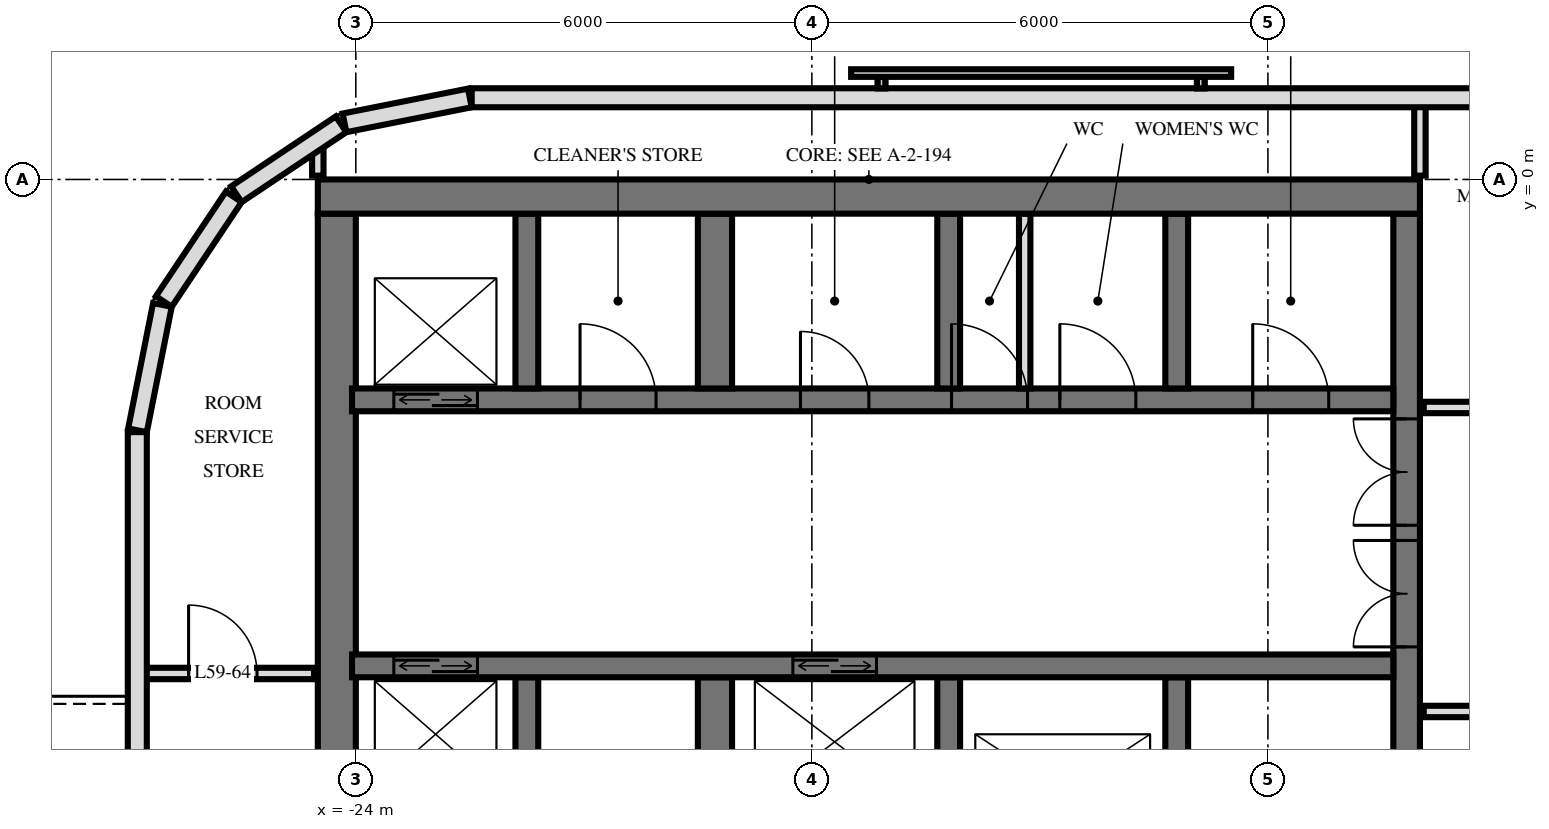
"""IFC4 building model, lengths in metres.
Left out: names, types, materials, properties, quantities, classifications, styles, units other than length and angle.
Written with IfcOpenShell. Run it as: python <this file> out.ifc"""

import sys

from ifc_helpers import new_model, si_unit, direction, frame, frame_2d, origin, place, context, subcontext, project, spatial, rectangle, extrude, element, fill, save


model = new_model("IFC4")
c1 = context("Model", 3, precision=1e-05, world=origin(), true_north=direction((0.0, 1.0)))
c2 = subcontext(c1, "Body", "Model", "MODEL_VIEW")
j1 = project(units=[si_unit("LENGTHUNIT", "METRE"), si_unit("PLANEANGLEUNIT", "RADIAN")], contexts=[c1])
p1 = place(None, origin())
s1 = spatial("IfcSite", under=j1, at=p1, CompositionType="ELEMENT")
p2 = place(p1, origin())
s2 = spatial("IfcBuilding", under=s1, at=p2, CompositionType="ELEMENT")
p3 = place(p2, frame((0.0, 0.0, 225.6)))
s3 = spatial("IfcBuildingStorey", under=s2, at=p3, CompositionType="ELEMENT", Elevation=225.6)
p4 = place(p3, frame((-24.5, -0.225, 0.0), z_axis=(0.0, 0.0, 1.0), x_axis=(1.0, 0.0, 0.0)))
e1 = element("IfcWall", 1, at=p4, inside=s3, PredefinedType="SHEAR", context=c2, shape_type="SweptSolid", body=[
    extrude(rectangle(XDim=14.5, YDim=0.45, at=frame_2d((7.25, 0.0))), origin(), (0.0, 0.0, 1.0), 3.5),
])
p5 = place(p3, frame((-10.175, -14.55, 0.0), z_axis=(0.0, 0.0, 1.0), x_axis=(0.0, 1.0, 0.0)))
e2 = element("IfcWall", 2, at=p5, inside=s3, PredefinedType="SHEAR", context=c2, shape_type="SweptSolid", body=[
    extrude(rectangle(XDim=14.1, YDim=0.35, at=frame_2d((7.05, 0.0))), origin(), (0.0, 0.0, 1.0), 3.5),
])
p6 = place(p5, frame((8.4, 0.0, 0.0)))
e3 = element("IfcOpeningElement", 3, at=p6, cuts=e2, PredefinedType="OPENING", context=c2, shape_type="SweptSolid", body=[
    extrude(rectangle(XDim=1.4, YDim=2.4, at=frame_2d((0.7, 1.2))), frame((0.0, 0.185, 0.0), z_axis=(0.0, -1.0, 0.0), x_axis=(1.0, 0.0, 0.0)), (0.0, 0.0, 1.0), 0.37),
])
p7 = place(p5, frame((10.0, 0.0, 0.0)))
e4 = element("IfcOpeningElement", 4, at=p7, cuts=e2, PredefinedType="OPENING", context=c2, shape_type="SweptSolid", body=[
    extrude(rectangle(XDim=1.4, YDim=2.4, at=frame_2d((0.7, 1.2))), frame((0.0, 0.185, 0.0), z_axis=(0.0, -1.0, 0.0), x_axis=(1.0, 0.0, 0.0)), (0.0, 0.0, 1.0), 0.37),
])
p8 = place(p5, frame((4.0, 0.0, 0.0)))
e5 = element("IfcOpeningElement", 5, at=p8, cuts=e2, PredefinedType="OPENING", context=c2, shape_type="SweptSolid", body=[
    extrude(rectangle(XDim=1.2, YDim=2.1, at=frame_2d((0.6, 1.05))), frame((0.0, 0.185, 0.0), z_axis=(0.0, -1.0, 0.0), x_axis=(1.0, 0.0, 0.0)), (0.0, 0.0, 1.0), 0.37),
])
p9 = place(p3, frame((-24.25, -14.55, 0.0), z_axis=(0.0, 0.0, 1.0), x_axis=(0.0, 1.0, 0.0)))
e6 = element("IfcWall", 6, at=p9, inside=s3, PredefinedType="SHEAR", context=c2, shape_type="SweptSolid", body=[
    extrude(rectangle(XDim=14.1, YDim=0.5, at=frame_2d((7.05, 0.0))), origin(), (0.0, 0.0, 1.0), 3.5),
])
p10 = place(p3, frame((-24.05, -2.9, 0.0), z_axis=(0.0, 0.0, 1.0), x_axis=(1.0, 0.0, 0.0)))
e7 = element("IfcWall", 7, at=p10, inside=s3, PredefinedType="SHEAR", context=c2, shape_type="SweptSolid", body=[
    extrude(rectangle(XDim=13.7, YDim=0.3, at=frame_2d((6.85, 0.0))), origin(), (0.0, 0.0, 1.0), 3.5),
])
p11 = place(p10, frame((0.55, 0.0, 0.0)))
e8 = element("IfcOpeningElement", 8, at=p11, cuts=e7, PredefinedType="OPENING", context=c2, shape_type="SweptSolid", body=[
    extrude(rectangle(XDim=1.1, YDim=2.1, at=frame_2d((0.55, 1.05))), frame((0.0, 0.16, 0.0), z_axis=(0.0, -1.0, 0.0), x_axis=(1.0, 0.0, 0.0)), (0.0, 0.0, 1.0), 0.32),
])
p12 = place(p10, frame((5.9, 0.0, 0.0)))
e9 = element("IfcOpeningElement", 9, at=p12, cuts=e7, PredefinedType="OPENING", context=c2, shape_type="SweptSolid", body=[
    extrude(rectangle(XDim=0.9, YDim=2.1, at=frame_2d((0.45, 1.05))), frame((0.0, 0.16, 0.0), z_axis=(0.0, -1.0, 0.0), x_axis=(1.0, 0.0, 0.0)), (0.0, 0.0, 1.0), 0.32),
])
p13 = place(p10, frame((11.85, 0.0, 0.0)))
e10 = element("IfcOpeningElement", 10, at=p13, cuts=e7, PredefinedType="OPENING", context=c2, shape_type="SweptSolid", body=[
    extrude(rectangle(XDim=1.0, YDim=2.1, at=frame_2d((0.5, 1.05))), frame((0.0, 0.16, 0.0), z_axis=(0.0, -1.0, 0.0), x_axis=(1.0, 0.0, 0.0)), (0.0, 0.0, 1.0), 0.32),
])
p14 = place(p10, frame((9.312, 0.0, 0.0)))
e11 = element("IfcOpeningElement", 11, at=p14, cuts=e7, PredefinedType="OPENING", context=c2, shape_type="SweptSolid", body=[
    extrude(rectangle(XDim=1.0, YDim=2.1, at=frame_2d((0.5, 1.05))), frame((0.0, 0.16, 0.0), z_axis=(0.0, -1.0, 0.0), x_axis=(1.0, 0.0, 0.0)), (0.0, 0.0, 1.0), 0.32),
])
p15 = place(p10, frame((7.887, 0.0, 0.0)))
e12 = element("IfcOpeningElement", 12, at=p15, cuts=e7, PredefinedType="OPENING", context=c2, shape_type="SweptSolid", body=[
    extrude(rectangle(XDim=1.0, YDim=2.1, at=frame_2d((0.5, 1.05))), frame((0.0, 0.16, 0.0), z_axis=(0.0, -1.0, 0.0), x_axis=(1.0, 0.0, 0.0)), (0.0, 0.0, 1.0), 0.32),
])
p16 = place(p10, frame((3.0, 0.0, 0.0)))
e13 = element("IfcOpeningElement", 13, at=p16, cuts=e7, PredefinedType="OPENING", context=c2, shape_type="SweptSolid", body=[
    extrude(rectangle(XDim=1.0, YDim=2.1, at=frame_2d((0.5, 1.05))), frame((0.0, 0.16, 0.0), z_axis=(0.0, -1.0, 0.0), x_axis=(1.0, 0.0, 0.0)), (0.0, 0.0, 1.0), 0.32),
])
p17 = place(p3, frame((-24.05, -6.4, 0.0), z_axis=(0.0, 0.0, 1.0), x_axis=(1.0, 0.0, 0.0)))
e14 = element("IfcWall", 14, at=p17, inside=s3, PredefinedType="SHEAR", context=c2, shape_type="SweptSolid", body=[
    extrude(rectangle(XDim=13.7, YDim=0.3, at=frame_2d((6.85, 0.0))), origin(), (0.0, 0.0, 1.0), 3.5),
])
p18 = place(p17, frame((0.55, 0.0, 0.0)))
e15 = element("IfcOpeningElement", 15, at=p18, cuts=e14, PredefinedType="OPENING", context=c2, shape_type="SweptSolid", body=[
    extrude(rectangle(XDim=1.1, YDim=2.1, at=frame_2d((0.55, 1.05))), frame((0.0, 0.16, 0.0), z_axis=(0.0, -1.0, 0.0), x_axis=(1.0, 0.0, 0.0)), (0.0, 0.0, 1.0), 0.32),
])
p19 = place(p17, frame((5.8, 0.0, 0.0)))
e16 = element("IfcOpeningElement", 16, at=p19, cuts=e14, PredefinedType="OPENING", context=c2, shape_type="SweptSolid", body=[
    extrude(rectangle(XDim=1.1, YDim=2.1, at=frame_2d((0.55, 1.05))), frame((0.0, 0.16, 0.0), z_axis=(0.0, -1.0, 0.0), x_axis=(1.0, 0.0, 0.0)), (0.0, 0.0, 1.0), 0.32),
])
for number, where, z_axis, x_axis in (
    (17, (-13.2, -2.75, 0.0), (0.0, 0.0, 1.0), (0.0, 1.0, 0.0)),
    (18, (-13.2, -8.85, 0.0), (0.0, 0.0, 1.0), (0.0, 1.0, 0.0)),
    (19, (-16.2, -2.75, 0.0), (0.0, 0.0, 1.0), (0.0, 1.0, 0.0)),
    (20, (-16.2, -8.85, 0.0), (0.0, 0.0, 1.0), (0.0, 1.0, 0.0)),
):
    element("IfcWall", number, at=place(p3, frame(where, z_axis=z_axis, x_axis=x_axis)), inside=s3, PredefinedType="SHEAR", context=c2, shape_type="SweptSolid", body=[
        extrude(rectangle(XDim=2.3, YDim=0.3, at=frame_2d((1.15, 0.0))), origin(), (0.0, 0.0, 1.0), 3.5),
    ])
for number, where, z_axis, x_axis in (
    (21, (-19.275, -2.75, 0.0), (0.0, 0.0, 1.0), (0.0, 1.0, 0.0)),
    (22, (-19.275, -8.85, 0.0), (0.0, 0.0, 1.0), (0.0, 1.0, 0.0)),
):
    element("IfcWall", number, at=place(p3, frame(where, z_axis=z_axis, x_axis=x_axis)), inside=s3, PredefinedType="SHEAR", context=c2, shape_type="SweptSolid", body=[
        extrude(rectangle(XDim=2.3, YDim=0.45, at=frame_2d((1.15, 0.0))), origin(), (0.0, 0.0, 1.0), 3.5),
    ])
for number, where, z_axis, x_axis in (
    (23, (-21.75, -2.75, 0.0), (0.0, 0.0, 1.0), (0.0, 1.0, 0.0)),
    (24, (-21.75, -8.85, 0.0), (0.0, 0.0, 1.0), (0.0, 1.0, 0.0)),
):
    element("IfcWall", number, at=place(p3, frame(where, z_axis=z_axis, x_axis=x_axis)), inside=s3, PredefinedType="SHEAR", context=c2, shape_type="SweptSolid", body=[
        extrude(rectangle(XDim=2.3, YDim=0.3, at=frame_2d((1.15, 0.0))), origin(), (0.0, 0.0, 1.0), 3.5),
    ])
p20 = place(p3, frame((22.475, 1.075, 0.0), z_axis=(0.0, 0.0, 1.0), x_axis=(-1.0, 0.0, 0.0)))
e25 = element("IfcWall", 25, at=p20, inside=s3, PredefinedType="SOLIDWALL", context=c2, shape_type="SweptSolid", body=[
    extrude(rectangle(XDim=44.951, YDim=0.25, at=frame_2d((22.475, 0.0))), origin(), (0.0, 0.0, 1.0), 3.22),
])
p21 = place(p20, frame((15.275, 0.0, 0.9)))
e26 = element("IfcOpeningElement", 26, at=p21, cuts=e25, PredefinedType="OPENING", context=c2, shape_type="SweptSolid", body=[
    extrude(rectangle(XDim=2.4, YDim=1.5, at=frame_2d((1.2, 0.75))), frame((0.0, 0.135, 0.0), z_axis=(0.0, -1.0, 0.0), x_axis=(1.0, 0.0, 0.0)), (0.0, 0.0, 1.0), 0.27),
])
p22 = place(p20, frame((18.275, 0.0, 0.9)))
e27 = element("IfcOpeningElement", 27, at=p22, cuts=e25, PredefinedType="OPENING", context=c2, shape_type="SweptSolid", body=[
    extrude(rectangle(XDim=2.4, YDim=1.5, at=frame_2d((1.2, 0.75))), frame((0.0, 0.135, 0.0), z_axis=(0.0, -1.0, 0.0), x_axis=(1.0, 0.0, 0.0)), (0.0, 0.0, 1.0), 0.27),
])
p23 = place(p20, frame((29.275, 0.0, 0.9)))
e28 = element("IfcOpeningElement", 28, at=p23, cuts=e25, PredefinedType="OPENING", context=c2, shape_type="SweptSolid", body=[
    extrude(rectangle(XDim=2.4, YDim=1.5, at=frame_2d((1.2, 0.75))), frame((0.0, 0.135, 0.0), z_axis=(0.0, -1.0, 0.0), x_axis=(1.0, 0.0, 0.0)), (0.0, 0.0, 1.0), 0.27),
])
p24 = place(p3, frame((-22.5, 1.073, 0.0), z_axis=(0.0, 0.0, 1.0), x_axis=(-0.980803419081, -0.194999110559, 0.0)))
e29 = element("IfcWall", 29, at=p24, inside=s3, PredefinedType="SOLIDWALL", context=c2, shape_type="SweptSolid", body=[
    extrude(rectangle(XDim=1.681, YDim=0.25, at=frame_2d((0.841, 0.0))), origin(), (0.0, 0.0, 1.0), 3.22),
])
for number, where, z_axis, x_axis in (
    (30, (-24.194, 0.726, 0.0), (0.0, 0.0, 1.0), (-0.831, -0.556, 0.0)),
    (31, (-25.606, -0.229, 0.0), (0.0, 0.0, 1.0), (-0.556, -0.831, 0.0)),
):
    element("IfcWall", number, at=place(p3, frame(where, z_axis=z_axis, x_axis=x_axis)), inside=s3, PredefinedType="SOLIDWALL", context=c2, shape_type="SweptSolid", body=[
        extrude(rectangle(XDim=1.656, YDim=0.25, at=frame_2d((0.828, 0.0))), origin(), (0.0, 0.0, 1.0), 3.22),
    ])
p25 = place(p3, frame((-26.545, -1.651, 0.0), z_axis=(0.0, 0.0, 1.0), x_axis=(-0.194999110559, -0.980803419081, 0.0)))
e32 = element("IfcWall", 32, at=p25, inside=s3, PredefinedType="SOLIDWALL", context=c2, shape_type="SweptSolid", body=[
    extrude(rectangle(XDim=1.681, YDim=0.25, at=frame_2d((0.841, 0.0))), origin(), (0.0, 0.0, 1.0), 3.22),
])
p26 = place(p3, frame((-26.875, -3.325, 0.0), z_axis=(0.0, 0.0, 1.0), x_axis=(0.0, -1.0, 0.0)))
e33 = element("IfcWall", 33, at=p26, inside=s3, PredefinedType="SOLIDWALL", context=c2, shape_type="SweptSolid", body=[
    extrude(rectangle(XDim=21.551, YDim=0.25, at=frame_2d((10.775, 0.0))), origin(), (0.0, 0.0, 1.0), 3.22),
])
p27 = place(p26, frame((6.575, 0.0, 0.0)))
e34 = element("IfcOpeningElement", 34, at=p27, cuts=e33, PredefinedType="OPENING", context=c2, shape_type="SweptSolid", body=[
    extrude(rectangle(XDim=1.8, YDim=2.4, at=frame_2d((0.9, 1.2))), frame((0.0, 0.135, 0.0), z_axis=(0.0, -1.0, 0.0), x_axis=(1.0, 0.0, 0.0)), (0.0, 0.0, 1.0), 0.27),
])
p28 = place(p26, frame((9.425, 0.0, 0.9)))
e35 = element("IfcOpeningElement", 35, at=p28, cuts=e33, PredefinedType="OPENING", context=c2, shape_type="SweptSolid", body=[
    extrude(rectangle(XDim=1.8, YDim=1.5, at=frame_2d((0.9, 0.75))), frame((0.0, 0.135, 0.0), z_axis=(0.0, -1.0, 0.0), x_axis=(1.0, 0.0, 0.0)), (0.0, 0.0, 1.0), 0.27),
])
p29 = place(p26, frame((12.575, 0.0, 0.9)))
e36 = element("IfcOpeningElement", 36, at=p29, cuts=e33, PredefinedType="OPENING", context=c2, shape_type="SweptSolid", body=[
    extrude(rectangle(XDim=1.2, YDim=1.5, at=frame_2d((0.6, 0.75))), frame((0.0, 0.135, 0.0), z_axis=(0.0, -1.0, 0.0), x_axis=(1.0, 0.0, 0.0)), (0.0, 0.0, 1.0), 0.27),
])
p30 = place(p26, frame((15.275, 0.0, 0.0)))
e37 = element("IfcOpeningElement", 37, at=p30, cuts=e33, PredefinedType="OPENING", context=c2, shape_type="SweptSolid", body=[
    extrude(rectangle(XDim=1.8, YDim=2.4, at=frame_2d((0.9, 1.2))), frame((0.0, 0.135, 0.0), z_axis=(0.0, -1.0, 0.0), x_axis=(1.0, 0.0, 0.0)), (0.0, 0.0, 1.0), 0.27),
])
p31 = place(p26, frame((18.875, 0.0, 0.0)))
e38 = element("IfcOpeningElement", 38, at=p31, cuts=e33, PredefinedType="OPENING", context=c2, shape_type="SweptSolid", body=[
    extrude(rectangle(XDim=1.8, YDim=2.4, at=frame_2d((0.9, 1.2))), frame((0.0, 0.135, 0.0), z_axis=(0.0, -1.0, 0.0), x_axis=(1.0, 0.0, 0.0)), (0.0, 0.0, 1.0), 0.27),
])
p32 = place(p3, frame((-15.2, -2.75, 0.0), z_axis=(0.0, 0.0, 1.0), x_axis=(0.0, 1.0, 0.0)))
e39 = element("IfcWall", 39, at=p32, inside=s3, PredefinedType="PARTITIONING", context=c2, shape_type="SweptSolid", body=[
    extrude(rectangle(XDim=2.3, YDim=0.15, at=frame_2d((1.15, 0.0))), origin(), (0.0, 0.0, 1.0), 3.2),
])
p33 = place(p3, frame((-10.0, 0.05, 0.0), z_axis=(0.0, 0.0, 1.0), x_axis=(0.0, 1.0, 0.0)))
e40 = element("IfcWall", 40, at=p33, inside=s3, PredefinedType="PARTITIONING", context=c2, shape_type="SweptSolid", body=[
    extrude(rectangle(XDim=0.97, YDim=0.15, at=frame_2d((0.485, 0.0))), origin(), (0.0, 0.0, 1.0), 3.22),
])
p34 = place(p3, frame((-24.5, 0.05, 0.0), z_axis=(0.0, 0.0, 1.0), x_axis=(0.0, 1.0, 0.0)))
e41 = element("IfcWall", 41, at=p34, inside=s3, PredefinedType="PARTITIONING", context=c2, shape_type="SweptSolid", body=[
    extrude(rectangle(XDim=0.405, YDim=0.15, at=frame_2d((0.203, 0.0))), origin(), (0.0, 0.0, 1.0), 3.22),
])
p35 = place(p3, frame((-9.95, -7.0, 0.0), z_axis=(0.0, 0.0, 1.0), x_axis=(1.0, 0.0, 0.0)))
e42 = element("IfcWall", 42, at=p35, inside=s3, PredefinedType="PARTITIONING", context=c2, shape_type="SweptSolid", body=[
    extrude(rectangle(XDim=19.9, YDim=0.15, at=frame_2d((9.95, 0.0))), origin(), (0.0, 0.0, 1.0), 3.22),
])
p36 = place(p35, frame((9.45, 0.0, 0.0)))
e43 = element("IfcOpeningElement", 43, at=p36, cuts=e42, PredefinedType="OPENING", context=c2, shape_type="SweptSolid", body=[
    extrude(rectangle(XDim=1.0, YDim=2.1, at=frame_2d((0.5, 1.05))), frame((0.0, 0.085, 0.0), z_axis=(0.0, -1.0, 0.0), x_axis=(1.0, 0.0, 0.0)), (0.0, 0.0, 1.0), 0.17),
])
p37 = place(p35, frame((3.45, 0.0, 0.0)))
e44 = element("IfcOpeningElement", 44, at=p37, cuts=e42, PredefinedType="OPENING", context=c2, shape_type="SweptSolid", body=[
    extrude(rectangle(XDim=1.0, YDim=2.1, at=frame_2d((0.5, 1.05))), frame((0.0, 0.085, 0.0), z_axis=(0.0, -1.0, 0.0), x_axis=(1.0, 0.0, 0.0)), (0.0, 0.0, 1.0), 0.17),
])
p38 = place(p3, frame((-26.82, -6.5, 0.0), z_axis=(0.0, 0.0, 1.0), x_axis=(1.0, 0.0, 0.0)))
e45 = element("IfcWall", 45, at=p38, inside=s3, PredefinedType="PARTITIONING", context=c2, shape_type="SweptSolid", body=[
    extrude(rectangle(XDim=2.27, YDim=0.15, at=frame_2d((1.135, 0.0))), origin(), (0.0, 0.0, 1.0), 3.22),
])
p39 = place(p38, frame((0.62, 0.0, 0.0)))
e46 = element("IfcOpeningElement", 46, at=p39, cuts=e45, PredefinedType="OPENING", context=c2, shape_type="SweptSolid", body=[
    extrude(rectangle(XDim=0.9, YDim=2.1, at=frame_2d((0.45, 1.05))), frame((0.0, 0.085, 0.0), z_axis=(0.0, -1.0, 0.0), x_axis=(1.0, 0.0, 0.0)), (0.0, 0.0, 1.0), 0.17),
])
p40 = place(p3, frame((-9.95, -3.0, 0.0), z_axis=(0.0, 0.0, 1.0), x_axis=(1.0, 0.0, 0.0)))
e47 = element("IfcWall", 47, at=p40, inside=s3, PredefinedType="PARTITIONING", context=c2, shape_type="SweptSolid", body=[
    extrude(rectangle(XDim=19.9, YDim=0.15, at=frame_2d((9.95, 0.0))), origin(), (0.0, 0.0, 1.0), 3.22),
])
p41 = place(p40, frame((1.45, 0.0, 0.0)))
e48 = element("IfcOpeningElement", 48, at=p41, cuts=e47, PredefinedType="OPENING", context=c2, shape_type="SweptSolid", body=[
    extrude(rectangle(XDim=1.0, YDim=2.1, at=frame_2d((0.5, 1.05))), frame((0.0, 0.085, 0.0), z_axis=(0.0, -1.0, 0.0), x_axis=(1.0, 0.0, 0.0)), (0.0, 0.0, 1.0), 0.17),
])
p42 = place(p40, frame((4.95, 0.0, 0.0)))
e49 = element("IfcOpeningElement", 49, at=p42, cuts=e47, PredefinedType="OPENING", context=c2, shape_type="SweptSolid", body=[
    extrude(rectangle(XDim=1.0, YDim=2.1, at=frame_2d((0.5, 1.05))), frame((0.0, 0.085, 0.0), z_axis=(0.0, -1.0, 0.0), x_axis=(1.0, 0.0, 0.0)), (0.0, 0.0, 1.0), 0.17),
])
p43 = place(p40, frame((7.7, 0.0, 0.0)))
e50 = element("IfcOpeningElement", 50, at=p43, cuts=e47, PredefinedType="OPENING", context=c2, shape_type="SweptSolid", body=[
    extrude(rectangle(XDim=1.0, YDim=2.1, at=frame_2d((0.5, 1.05))), frame((0.0, 0.085, 0.0), z_axis=(0.0, -1.0, 0.0), x_axis=(1.0, 0.0, 0.0)), (0.0, 0.0, 1.0), 0.17),
])
p44 = place(p40, frame((14.2, 0.0, 0.0)))
e51 = element("IfcOpeningElement", 51, at=p44, cuts=e47, PredefinedType="OPENING", context=c2, shape_type="SweptSolid", body=[
    extrude(rectangle(XDim=1.0, YDim=2.1, at=frame_2d((0.5, 1.05))), frame((0.0, 0.085, 0.0), z_axis=(0.0, -1.0, 0.0), x_axis=(1.0, 0.0, 0.0)), (0.0, 0.0, 1.0), 0.17),
])
p45 = place(p11, origin())
e52 = element("IfcDoor", 52, at=p45, inside=s3, OperationType="DOUBLE_DOOR_SLIDING", PredefinedType="USERDEFINED", context=c2, shape_type="SweptSolid", body=[
    extrude(rectangle(XDim=1.1, YDim=2.1, at=frame_2d((0.55, 1.05))), frame((0.0, 0.025, 0.0), z_axis=(0.0, -1.0, 0.0), x_axis=(1.0, 0.0, 0.0)), (0.0, 0.0, 1.0), 0.05),
])
fill(e8, e52)
p46 = place(p18, origin())
e53 = element("IfcDoor", 53, at=p46, inside=s3, OperationType="DOUBLE_DOOR_SLIDING", PredefinedType="USERDEFINED", context=c2, shape_type="SweptSolid", body=[
    extrude(rectangle(XDim=1.1, YDim=2.1, at=frame_2d((0.55, 1.05))), frame((0.0, 0.025, 0.0), z_axis=(0.0, -1.0, 0.0), x_axis=(1.0, 0.0, 0.0)), (0.0, 0.0, 1.0), 0.05),
])
fill(e15, e53)
p47 = place(p19, origin())
e54 = element("IfcDoor", 54, at=p47, inside=s3, OperationType="DOUBLE_DOOR_SLIDING", PredefinedType="USERDEFINED", context=c2, shape_type="SweptSolid", body=[
    extrude(rectangle(XDim=1.1, YDim=2.1, at=frame_2d((0.55, 1.05))), frame((0.0, 0.025, 0.0), z_axis=(0.0, -1.0, 0.0), x_axis=(1.0, 0.0, 0.0)), (0.0, 0.0, 1.0), 0.05),
])
fill(e16, e54)
p48 = place(p6, origin())
e55 = element("IfcDoor", 55, at=p48, inside=s3, OperationType="DOUBLE_DOOR_SINGLE_SWING", PredefinedType="DOOR", context=c2, shape_type="SweptSolid", body=[
    extrude(rectangle(XDim=1.4, YDim=2.4, at=frame_2d((0.7, 1.2))), frame((0.0, 0.025, 0.0), z_axis=(0.0, -1.0, 0.0), x_axis=(1.0, 0.0, 0.0)), (0.0, 0.0, 1.0), 0.05),
])
fill(e3, e55)
p49 = place(p7, origin())
e56 = element("IfcDoor", 56, at=p49, inside=s3, OperationType="DOUBLE_DOOR_SINGLE_SWING", PredefinedType="DOOR", context=c2, shape_type="SweptSolid", body=[
    extrude(rectangle(XDim=1.4, YDim=2.4, at=frame_2d((0.7, 1.2))), frame((0.0, 0.025, 0.0), z_axis=(0.0, -1.0, 0.0), x_axis=(1.0, 0.0, 0.0)), (0.0, 0.0, 1.0), 0.05),
])
fill(e4, e56)
p50 = place(p12, origin())
e57 = element("IfcDoor", 57, at=p50, inside=s3, OperationType="SINGLE_SWING_RIGHT", PredefinedType="DOOR", context=c2, shape_type="SweptSolid", body=[
    extrude(rectangle(XDim=0.9, YDim=2.1, at=frame_2d((0.45, 1.05))), frame((0.0, 0.025, 0.0), z_axis=(0.0, -1.0, 0.0), x_axis=(1.0, 0.0, 0.0)), (0.0, 0.0, 1.0), 0.05),
])
fill(e9, e57)
p51 = place(p13, origin())
e58 = element("IfcDoor", 58, at=p51, inside=s3, OperationType="SINGLE_SWING_RIGHT", PredefinedType="DOOR", context=c2, shape_type="SweptSolid", body=[
    extrude(rectangle(XDim=1.0, YDim=2.1, at=frame_2d((0.5, 1.05))), frame((0.0, 0.025, 0.0), z_axis=(0.0, -1.0, 0.0), x_axis=(1.0, 0.0, 0.0)), (0.0, 0.0, 1.0), 0.05),
])
fill(e10, e58)
p52 = place(p14, origin())
e59 = element("IfcDoor", 59, at=p52, inside=s3, OperationType="SINGLE_SWING_RIGHT", PredefinedType="DOOR", context=c2, shape_type="SweptSolid", body=[
    extrude(rectangle(XDim=1.0, YDim=2.1, at=frame_2d((0.5, 1.05))), frame((0.0, 0.025, 0.0), z_axis=(0.0, -1.0, 0.0), x_axis=(1.0, 0.0, 0.0)), (0.0, 0.0, 1.0), 0.05),
])
fill(e11, e59)
p53 = place(p15, origin())
e60 = element("IfcDoor", 60, at=p53, inside=s3, OperationType="SINGLE_SWING_RIGHT", PredefinedType="DOOR", context=c2, shape_type="SweptSolid", body=[
    extrude(rectangle(XDim=1.0, YDim=2.1, at=frame_2d((0.5, 1.05))), frame((0.0, 0.025, 0.0), z_axis=(0.0, -1.0, 0.0), x_axis=(1.0, 0.0, 0.0)), (0.0, 0.0, 1.0), 0.05),
])
fill(e12, e60)
p54 = place(p16, origin())
e61 = element("IfcDoor", 61, at=p54, inside=s3, OperationType="SINGLE_SWING_RIGHT", PredefinedType="DOOR", context=c2, shape_type="SweptSolid", body=[
    extrude(rectangle(XDim=1.0, YDim=2.1, at=frame_2d((0.5, 1.05))), frame((0.0, 0.025, 0.0), z_axis=(0.0, -1.0, 0.0), x_axis=(1.0, 0.0, 0.0)), (0.0, 0.0, 1.0), 0.05),
])
fill(e13, e61)
p55 = place(p39, origin())
e62 = element("IfcDoor", 62, at=p55, inside=s3, OperationType="SINGLE_SWING_RIGHT", PredefinedType="DOOR", context=c2, shape_type="SweptSolid", body=[
    extrude(rectangle(XDim=0.9, YDim=2.1, at=frame_2d((0.45, 1.05))), frame((0.0, 0.025, 0.0), z_axis=(0.0, -1.0, 0.0), x_axis=(1.0, 0.0, 0.0)), (0.0, 0.0, 1.0), 0.05),
])
fill(e46, e62)
save(model, sys.argv[1])
